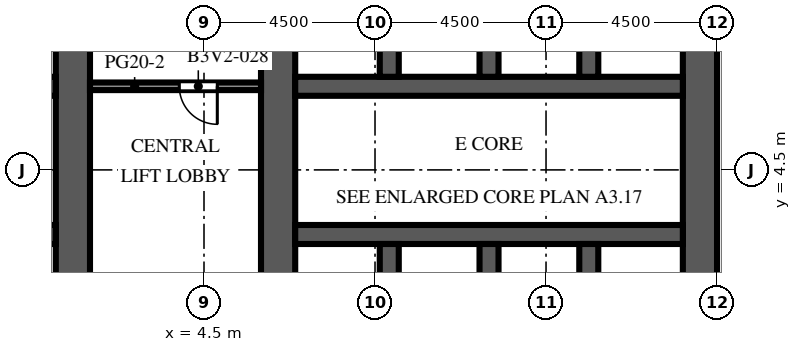
"""IFC4 building model, lengths in metres.
Left out: names, types, materials, properties, quantities, classifications, styles, units other than length and angle.
Written with IfcOpenShell. Run it as: python <this file> out.ifc"""

import sys

from ifc_helpers import new_model, si_unit, direction, frame, frame_2d, origin, place, context, subcontext, project, spatial, rectangle, extrude, element, fill, save


model = new_model("IFC4")
c1 = context("Model", 3, precision=1e-05, world=origin(), true_north=direction((0.0, 1.0)))
c2 = subcontext(c1, "Body", "Model", "MODEL_VIEW")
j1 = project(units=[si_unit("LENGTHUNIT", "METRE"), si_unit("PLANEANGLEUNIT", "RADIAN")], contexts=[c1])
p1 = place(None, origin())
s1 = spatial("IfcSite", under=j1, at=p1, CompositionType="ELEMENT")
p2 = place(p1, origin())
s2 = spatial("IfcBuilding", under=s1, at=p2, CompositionType="ELEMENT")
p3 = place(p2, frame((0.0, 0.0, 106.6)))
s3 = spatial("IfcBuildingStorey", under=s2, at=p3, CompositionType="ELEMENT", Elevation=106.6)
p4 = place(p3, frame((1.05, -9.0, 0.0), z_axis=(0.0, 0.0, 1.0), x_axis=(0.0, 1.0, 0.0)))
e1 = element("IfcWall", 1, at=p4, inside=s3, PredefinedType="SHEAR", context=c2, shape_type="SweptSolid", body=[
    extrude(rectangle(XDim=27.5, YDim=0.9, at=frame_2d((13.75, 0.0))), origin(), (0.0, 0.0, 1.0), 4.1),
])
p5 = place(p4, frame((12.55, 0.0, 0.0)))
e2 = element("IfcOpeningElement", 2, at=p5, cuts=e1, PredefinedType="OPENING", context=c2, shape_type="SweptSolid", body=[
    extrude(rectangle(XDim=2.4, YDim=2.4, at=frame_2d((1.2, 1.2))), frame((0.0, 0.46, 0.0), z_axis=(0.0, -1.0, 0.0), x_axis=(1.0, 0.0, 0.0)), (0.0, 0.0, 1.0), 0.92),
])
p6 = place(p4, frame((3.893, 0.0, 0.0)))
e3 = element("IfcOpeningElement", 3, at=p6, cuts=e1, PredefinedType="OPENING", context=c2, shape_type="SweptSolid", body=[
    extrude(rectangle(XDim=0.923, YDim=2.1, at=frame_2d((0.461, 1.05))), frame((0.0, 0.46, 0.0), z_axis=(0.0, -1.0, 0.0), x_axis=(1.0, 0.0, 0.0)), (0.0, 0.0, 1.0), 0.92),
])
p7 = place(p4, frame((23.427, 0.0, 0.0)))
e4 = element("IfcOpeningElement", 4, at=p7, cuts=e1, PredefinedType="OPENING", context=c2, shape_type="SweptSolid", body=[
    extrude(rectangle(XDim=1.2, YDim=2.1, at=frame_2d((0.6, 1.05))), frame((0.0, 0.46, 0.0), z_axis=(0.0, -1.0, 0.0), x_axis=(1.0, 0.0, 0.0)), (0.0, 0.0, 1.0), 0.92),
])
p8 = place(p3, frame((-9.6, 2.8, 0.0), z_axis=(0.0, 0.0, 1.0), x_axis=(1.0, 0.0, 0.0)))
e5 = element("IfcWall", 5, at=p8, inside=s3, PredefinedType="SHEAR", context=c2, shape_type="SweptSolid", body=[
    extrude(rectangle(XDim=10.2, YDim=0.5, at=frame_2d((5.1, 0.0))), origin(), (0.0, 0.0, 1.0), 4.1),
])
p9 = place(p8, frame((0.562, 0.0, 0.0)))
e6 = element("IfcOpeningElement", 6, at=p9, cuts=e5, PredefinedType="OPENING", context=c2, shape_type="SweptSolid", body=[
    extrude(rectangle(XDim=1.1, YDim=2.1, at=frame_2d((0.55, 1.05))), frame((0.0, 0.26, 0.0), z_axis=(0.0, -1.0, 0.0), x_axis=(1.0, 0.0, 0.0)), (0.0, 0.0, 1.0), 0.52),
])
p10 = place(p8, frame((3.238, 0.0, 0.0)))
e7 = element("IfcOpeningElement", 7, at=p10, cuts=e5, PredefinedType="OPENING", context=c2, shape_type="SweptSolid", body=[
    extrude(rectangle(XDim=1.1, YDim=2.1, at=frame_2d((0.55, 1.05))), frame((0.0, 0.26, 0.0), z_axis=(0.0, -1.0, 0.0), x_axis=(1.0, 0.0, 0.0)), (0.0, 0.0, 1.0), 0.52),
])
p11 = place(p8, frame((8.538, 0.0, 0.0)))
e8 = element("IfcOpeningElement", 8, at=p11, cuts=e5, PredefinedType="OPENING", context=c2, shape_type="SweptSolid", body=[
    extrude(rectangle(XDim=1.1, YDim=2.1, at=frame_2d((0.55, 1.05))), frame((0.0, 0.26, 0.0), z_axis=(0.0, -1.0, 0.0), x_axis=(1.0, 0.0, 0.0)), (0.0, 0.0, 1.0), 0.52),
])
p12 = place(p3, frame((-9.6, 6.7, 0.0), z_axis=(0.0, 0.0, 1.0), x_axis=(1.0, 0.0, 0.0)))
e9 = element("IfcWall", 9, at=p12, inside=s3, PredefinedType="SHEAR", context=c2, shape_type="SweptSolid", body=[
    extrude(rectangle(XDim=10.2, YDim=0.5, at=frame_2d((5.1, 0.0))), origin(), (0.0, 0.0, 1.0), 4.1),
])
p13 = place(p12, frame((0.562, 0.0, 0.0)))
e10 = element("IfcOpeningElement", 10, at=p13, cuts=e9, PredefinedType="OPENING", context=c2, shape_type="SweptSolid", body=[
    extrude(rectangle(XDim=1.1, YDim=2.1, at=frame_2d((0.55, 1.05))), frame((0.0, 0.26, 0.0), z_axis=(0.0, -1.0, 0.0), x_axis=(1.0, 0.0, 0.0)), (0.0, 0.0, 1.0), 0.52),
])
p14 = place(p12, frame((3.288, 0.0, 0.0)))
e11 = element("IfcOpeningElement", 11, at=p14, cuts=e9, PredefinedType="OPENING", context=c2, shape_type="SweptSolid", body=[
    extrude(rectangle(XDim=1.0, YDim=2.1, at=frame_2d((0.5, 1.05))), frame((0.0, 0.26, 0.0), z_axis=(0.0, -1.0, 0.0), x_axis=(1.0, 0.0, 0.0)), (0.0, 0.0, 1.0), 0.52),
])
p15 = place(p12, frame((5.913, 0.0, 0.0)))
e12 = element("IfcOpeningElement", 12, at=p15, cuts=e9, PredefinedType="OPENING", context=c2, shape_type="SweptSolid", body=[
    extrude(rectangle(XDim=1.0, YDim=2.1, at=frame_2d((0.5, 1.05))), frame((0.0, 0.26, 0.0), z_axis=(0.0, -1.0, 0.0), x_axis=(1.0, 0.0, 0.0)), (0.0, 0.0, 1.0), 0.52),
])
p16 = place(p12, frame((8.587, 0.0, 0.0)))
e13 = element("IfcOpeningElement", 13, at=p16, cuts=e9, PredefinedType="OPENING", context=c2, shape_type="SweptSolid", body=[
    extrude(rectangle(XDim=1.0, YDim=2.1, at=frame_2d((0.5, 1.05))), frame((0.0, 0.26, 0.0), z_axis=(0.0, -1.0, 0.0), x_axis=(1.0, 0.0, 0.0)), (0.0, 0.0, 1.0), 0.52),
])
p17 = place(p3, frame((6.45, -9.0, 0.0), z_axis=(0.0, 0.0, 1.0), x_axis=(0.0, 1.0, 0.0)))
e14 = element("IfcWall", 14, at=p17, inside=s3, PredefinedType="SHEAR", context=c2, shape_type="SweptSolid", body=[
    extrude(rectangle(XDim=27.5, YDim=0.9, at=frame_2d((13.75, 0.0))), origin(), (0.0, 0.0, 1.0), 4.1),
])
p18 = place(p17, frame((12.55, 0.0, 0.0)))
e15 = element("IfcOpeningElement", 15, at=p18, cuts=e14, PredefinedType="OPENING", context=c2, shape_type="SweptSolid", body=[
    extrude(rectangle(XDim=2.4, YDim=2.4, at=frame_2d((1.2, 1.2))), frame((0.0, 0.46, 0.0), z_axis=(0.0, -1.0, 0.0), x_axis=(1.0, 0.0, 0.0)), (0.0, 0.0, 1.0), 0.92),
])
p19 = place(p17, frame((3.893, 0.0, 0.0)))
e16 = element("IfcOpeningElement", 16, at=p19, cuts=e14, PredefinedType="OPENING", context=c2, shape_type="SweptSolid", body=[
    extrude(rectangle(XDim=0.923, YDim=2.1, at=frame_2d((0.461, 1.05))), frame((0.0, 0.46, 0.0), z_axis=(0.0, -1.0, 0.0), x_axis=(1.0, 0.0, 0.0)), (0.0, 0.0, 1.0), 0.92),
])
p20 = place(p17, frame((23.427, 0.0, 0.0)))
e17 = element("IfcOpeningElement", 17, at=p20, cuts=e14, PredefinedType="OPENING", context=c2, shape_type="SweptSolid", body=[
    extrude(rectangle(XDim=1.2, YDim=2.1, at=frame_2d((0.6, 1.05))), frame((0.0, 0.46, 0.0), z_axis=(0.0, -1.0, 0.0), x_axis=(1.0, 0.0, 0.0)), (0.0, 0.0, 1.0), 0.92),
])
p21 = place(p3, frame((17.55, -9.0, 0.0), z_axis=(0.0, 0.0, 1.0), x_axis=(0.0, 1.0, 0.0)))
e18 = element("IfcWall", 18, at=p21, inside=s3, PredefinedType="SHEAR", context=c2, shape_type="SweptSolid", body=[
    extrude(rectangle(XDim=27.5, YDim=0.9, at=frame_2d((13.75, 0.0))), origin(), (0.0, 0.0, 1.0), 4.1),
])
p22 = place(p21, frame((12.55, 0.0, 0.0)))
e19 = element("IfcOpeningElement", 19, at=p22, cuts=e18, PredefinedType="OPENING", context=c2, shape_type="SweptSolid", body=[
    extrude(rectangle(XDim=2.4, YDim=2.4, at=frame_2d((1.2, 1.2))), frame((0.0, 0.46, 0.0), z_axis=(0.0, -1.0, 0.0), x_axis=(1.0, 0.0, 0.0)), (0.0, 0.0, 1.0), 0.92),
])
p23 = place(p21, frame((6.825, 0.0, 0.0)))
e20 = element("IfcOpeningElement", 20, at=p23, cuts=e18, PredefinedType="OPENING", context=c2, shape_type="SweptSolid", body=[
    extrude(rectangle(XDim=1.2, YDim=2.1, at=frame_2d((0.6, 1.05))), frame((0.0, 0.46, 0.0), z_axis=(0.0, -1.0, 0.0), x_axis=(1.0, 0.0, 0.0)), (0.0, 0.0, 1.0), 0.92),
])
p24 = place(p21, frame((19.475, 0.0, 0.0)))
e21 = element("IfcOpeningElement", 21, at=p24, cuts=e18, PredefinedType="OPENING", context=c2, shape_type="SweptSolid", body=[
    extrude(rectangle(XDim=1.2, YDim=2.1, at=frame_2d((0.6, 1.05))), frame((0.0, 0.46, 0.0), z_axis=(0.0, -1.0, 0.0), x_axis=(1.0, 0.0, 0.0)), (0.0, 0.0, 1.0), 0.92),
])
p25 = place(p3, frame((6.9, 2.8, 0.0), z_axis=(0.0, 0.0, 1.0), x_axis=(1.0, 0.0, 0.0)))
e22 = element("IfcWall", 22, at=p25, inside=s3, PredefinedType="SHEAR", context=c2, shape_type="SweptSolid", body=[
    extrude(rectangle(XDim=10.2, YDim=0.5, at=frame_2d((5.1, 0.0))), origin(), (0.0, 0.0, 1.0), 4.1),
])
p26 = place(p25, frame((0.562, 0.0, 0.0)))
e23 = element("IfcOpeningElement", 23, at=p26, cuts=e22, PredefinedType="OPENING", context=c2, shape_type="SweptSolid", body=[
    extrude(rectangle(XDim=1.1, YDim=2.1, at=frame_2d((0.55, 1.05))), frame((0.0, 0.26, 0.0), z_axis=(0.0, -1.0, 0.0), x_axis=(1.0, 0.0, 0.0)), (0.0, 0.0, 1.0), 0.52),
])
p27 = place(p25, frame((3.238, 0.0, 0.0)))
e24 = element("IfcOpeningElement", 24, at=p27, cuts=e22, PredefinedType="OPENING", context=c2, shape_type="SweptSolid", body=[
    extrude(rectangle(XDim=1.1, YDim=2.1, at=frame_2d((0.55, 1.05))), frame((0.0, 0.26, 0.0), z_axis=(0.0, -1.0, 0.0), x_axis=(1.0, 0.0, 0.0)), (0.0, 0.0, 1.0), 0.52),
])
p28 = place(p25, frame((8.538, 0.0, 0.0)))
e25 = element("IfcOpeningElement", 25, at=p28, cuts=e22, PredefinedType="OPENING", context=c2, shape_type="SweptSolid", body=[
    extrude(rectangle(XDim=1.1, YDim=2.1, at=frame_2d((0.55, 1.05))), frame((0.0, 0.26, 0.0), z_axis=(0.0, -1.0, 0.0), x_axis=(1.0, 0.0, 0.0)), (0.0, 0.0, 1.0), 0.52),
])
p29 = place(p3, frame((6.9, 6.7, 0.0), z_axis=(0.0, 0.0, 1.0), x_axis=(1.0, 0.0, 0.0)))
e26 = element("IfcWall", 26, at=p29, inside=s3, PredefinedType="SHEAR", context=c2, shape_type="SweptSolid", body=[
    extrude(rectangle(XDim=10.2, YDim=0.5, at=frame_2d((5.1, 0.0))), origin(), (0.0, 0.0, 1.0), 4.1),
])
p30 = place(p29, frame((0.562, 0.0, 0.0)))
e27 = element("IfcOpeningElement", 27, at=p30, cuts=e26, PredefinedType="OPENING", context=c2, shape_type="SweptSolid", body=[
    extrude(rectangle(XDim=1.1, YDim=2.1, at=frame_2d((0.55, 1.05))), frame((0.0, 0.26, 0.0), z_axis=(0.0, -1.0, 0.0), x_axis=(1.0, 0.0, 0.0)), (0.0, 0.0, 1.0), 0.52),
])
p31 = place(p29, frame((3.288, 0.0, 0.0)))
e28 = element("IfcOpeningElement", 28, at=p31, cuts=e26, PredefinedType="OPENING", context=c2, shape_type="SweptSolid", body=[
    extrude(rectangle(XDim=1.0, YDim=2.1, at=frame_2d((0.5, 1.05))), frame((0.0, 0.26, 0.0), z_axis=(0.0, -1.0, 0.0), x_axis=(1.0, 0.0, 0.0)), (0.0, 0.0, 1.0), 0.52),
])
p32 = place(p29, frame((5.913, 0.0, 0.0)))
e29 = element("IfcOpeningElement", 29, at=p32, cuts=e26, PredefinedType="OPENING", context=c2, shape_type="SweptSolid", body=[
    extrude(rectangle(XDim=1.0, YDim=2.1, at=frame_2d((0.5, 1.05))), frame((0.0, 0.26, 0.0), z_axis=(0.0, -1.0, 0.0), x_axis=(1.0, 0.0, 0.0)), (0.0, 0.0, 1.0), 0.52),
])
p33 = place(p29, frame((8.587, 0.0, 0.0)))
e30 = element("IfcOpeningElement", 30, at=p33, cuts=e26, PredefinedType="OPENING", context=c2, shape_type="SweptSolid", body=[
    extrude(rectangle(XDim=1.0, YDim=2.1, at=frame_2d((0.5, 1.05))), frame((0.0, 0.26, 0.0), z_axis=(0.0, -1.0, 0.0), x_axis=(1.0, 0.0, 0.0)), (0.0, 0.0, 1.0), 0.52),
])
for number, where, z_axis, x_axis in (
    (31, (9.375, -0.25, 0.0), (0.0, 0.0, 1.0), (0.0, 1.0, 0.0)),
    (32, (9.375, 6.95, 0.0), (0.0, 0.0, 1.0), (0.0, 1.0, 0.0)),
    (33, (12.0, -0.25, 0.0), (0.0, 0.0, 1.0), (0.0, 1.0, 0.0)),
    (34, (12.0, 6.95, 0.0), (0.0, 0.0, 1.0), (0.0, 1.0, 0.0)),
    (35, (14.625, -0.25, 0.0), (0.0, 0.0, 1.0), (0.0, 1.0, 0.0)),
    (36, (14.625, 6.95, 0.0), (0.0, 0.0, 1.0), (0.0, 1.0, 0.0)),
):
    element("IfcWall", number, at=place(p3, frame(where, z_axis=z_axis, x_axis=x_axis)), inside=s3, PredefinedType="SHEAR", context=c2, shape_type="SweptSolid", body=[
        extrude(rectangle(XDim=2.8, YDim=0.5, at=frame_2d((1.4, 0.0))), origin(), (0.0, 0.0, 1.0), 4.1),
    ])
p34 = place(p3, frame((1.5, 6.7, 0.0), z_axis=(0.0, 0.0, 1.0), x_axis=(1.0, 0.0, 0.0)))
e37 = element("IfcWall", 37, at=p34, inside=s3, PredefinedType="PARTITIONING", context=c2, shape_type="SweptSolid", body=[
    extrude(rectangle(XDim=4.5, YDim=0.2, at=frame_2d((2.25, 0.0))), origin(), (0.0, 0.0, 1.0), 3.5),
])
p35 = place(p34, frame((2.35, 0.0, 0.0)))
e38 = element("IfcOpeningElement", 38, at=p35, cuts=e37, PredefinedType="OPENING", context=c2, shape_type="SweptSolid", body=[
    extrude(rectangle(XDim=1.0, YDim=2.1, at=frame_2d((0.5, 1.05))), frame((0.0, 0.11, 0.0), z_axis=(0.0, -1.0, 0.0), x_axis=(1.0, 0.0, 0.0)), (0.0, 0.0, 1.0), 0.22),
])
p36 = place(p26, origin())
e39 = element("IfcDoor", 39, at=p36, inside=s3, OperationType="DOUBLE_DOOR_SLIDING", PredefinedType="DOOR", context=c2, shape_type="SweptSolid", body=[
    extrude(rectangle(XDim=1.1, YDim=2.1, at=frame_2d((0.55, 1.05))), frame((0.0, 0.025, 0.0), z_axis=(0.0, -1.0, 0.0), x_axis=(1.0, 0.0, 0.0)), (0.0, 0.0, 1.0), 0.05),
])
fill(e23, e39)
p37 = place(p27, origin())
e40 = element("IfcDoor", 40, at=p37, inside=s3, OperationType="DOUBLE_DOOR_SLIDING", PredefinedType="DOOR", context=c2, shape_type="SweptSolid", body=[
    extrude(rectangle(XDim=1.1, YDim=2.1, at=frame_2d((0.55, 1.05))), frame((0.0, 0.025, 0.0), z_axis=(0.0, -1.0, 0.0), x_axis=(1.0, 0.0, 0.0)), (0.0, 0.0, 1.0), 0.05),
])
fill(e24, e40)
p38 = place(p28, origin())
e41 = element("IfcDoor", 41, at=p38, inside=s3, OperationType="DOUBLE_DOOR_SLIDING", PredefinedType="DOOR", context=c2, shape_type="SweptSolid", body=[
    extrude(rectangle(XDim=1.1, YDim=2.1, at=frame_2d((0.55, 1.05))), frame((0.0, 0.025, 0.0), z_axis=(0.0, -1.0, 0.0), x_axis=(1.0, 0.0, 0.0)), (0.0, 0.0, 1.0), 0.05),
])
fill(e25, e41)
p39 = place(p30, origin())
e42 = element("IfcDoor", 42, at=p39, inside=s3, OperationType="DOUBLE_DOOR_SLIDING", PredefinedType="DOOR", context=c2, shape_type="SweptSolid", body=[
    extrude(rectangle(XDim=1.1, YDim=2.1, at=frame_2d((0.55, 1.05))), frame((0.0, 0.025, 0.0), z_axis=(0.0, -1.0, 0.0), x_axis=(1.0, 0.0, 0.0)), (0.0, 0.0, 1.0), 0.05),
])
fill(e27, e42)
p40 = place(p5, origin())
e43 = element("IfcDoor", 43, at=p40, inside=s3, OperationType="DOUBLE_DOOR_DOUBLE_SWING", PredefinedType="DOOR", context=c2, shape_type="SweptSolid", body=[
    extrude(rectangle(XDim=2.4, YDim=2.4, at=frame_2d((1.2, 1.2))), frame((0.0, 0.025, 0.0), z_axis=(0.0, -1.0, 0.0), x_axis=(1.0, 0.0, 0.0)), (0.0, 0.0, 1.0), 0.05),
])
fill(e2, e43)
p41 = place(p18, origin())
e44 = element("IfcDoor", 44, at=p41, inside=s3, OperationType="DOUBLE_DOOR_DOUBLE_SWING", PredefinedType="DOOR", context=c2, shape_type="SweptSolid", body=[
    extrude(rectangle(XDim=2.4, YDim=2.4, at=frame_2d((1.2, 1.2))), frame((0.0, 0.025, 0.0), z_axis=(0.0, -1.0, 0.0), x_axis=(1.0, 0.0, 0.0)), (0.0, 0.0, 1.0), 0.05),
])
fill(e15, e44)
p42 = place(p22, origin())
e45 = element("IfcDoor", 45, at=p42, inside=s3, OperationType="DOUBLE_DOOR_DOUBLE_SWING", PredefinedType="DOOR", context=c2, shape_type="SweptSolid", body=[
    extrude(rectangle(XDim=2.4, YDim=2.4, at=frame_2d((1.2, 1.2))), frame((0.0, 0.025, 0.0), z_axis=(0.0, -1.0, 0.0), x_axis=(1.0, 0.0, 0.0)), (0.0, 0.0, 1.0), 0.05),
])
fill(e19, e45)
p43 = place(p31, origin())
e46 = element("IfcDoor", 46, at=p43, inside=s3, OperationType="SINGLE_SWING_RIGHT", PredefinedType="DOOR", context=c2, shape_type="SweptSolid", body=[
    extrude(rectangle(XDim=1.0, YDim=2.1, at=frame_2d((0.5, 1.05))), frame((0.0, 0.025, 0.0), z_axis=(0.0, -1.0, 0.0), x_axis=(1.0, 0.0, 0.0)), (0.0, 0.0, 1.0), 0.05),
])
fill(e28, e46)
p44 = place(p32, origin())
e47 = element("IfcDoor", 47, at=p44, inside=s3, OperationType="SINGLE_SWING_LEFT", PredefinedType="DOOR", context=c2, shape_type="SweptSolid", body=[
    extrude(rectangle(XDim=1.0, YDim=2.1, at=frame_2d((0.5, 1.05))), frame((0.0, 0.025, 0.0), z_axis=(0.0, -1.0, 0.0), x_axis=(1.0, 0.0, 0.0)), (0.0, 0.0, 1.0), 0.05),
])
fill(e29, e47)
p45 = place(p33, origin())
e48 = element("IfcDoor", 48, at=p45, inside=s3, OperationType="SINGLE_SWING_RIGHT", PredefinedType="DOOR", context=c2, shape_type="SweptSolid", body=[
    extrude(rectangle(XDim=1.0, YDim=2.1, at=frame_2d((0.5, 1.05))), frame((0.0, 0.025, 0.0), z_axis=(0.0, -1.0, 0.0), x_axis=(1.0, 0.0, 0.0)), (0.0, 0.0, 1.0), 0.05),
])
fill(e30, e48)
p46 = place(p35, origin())
e49 = element("IfcDoor", 49, at=p46, inside=s3, OperationType="SINGLE_SWING_RIGHT", PredefinedType="DOOR", context=c2, shape_type="SweptSolid", body=[
    extrude(rectangle(XDim=1.0, YDim=2.1, at=frame_2d((0.5, 1.05))), frame((0.0, 0.025, 0.0), z_axis=(0.0, -1.0, 0.0), x_axis=(1.0, 0.0, 0.0)), (0.0, 0.0, 1.0), 0.05),
])
fill(e38, e49)
save(model, sys.argv[1])
